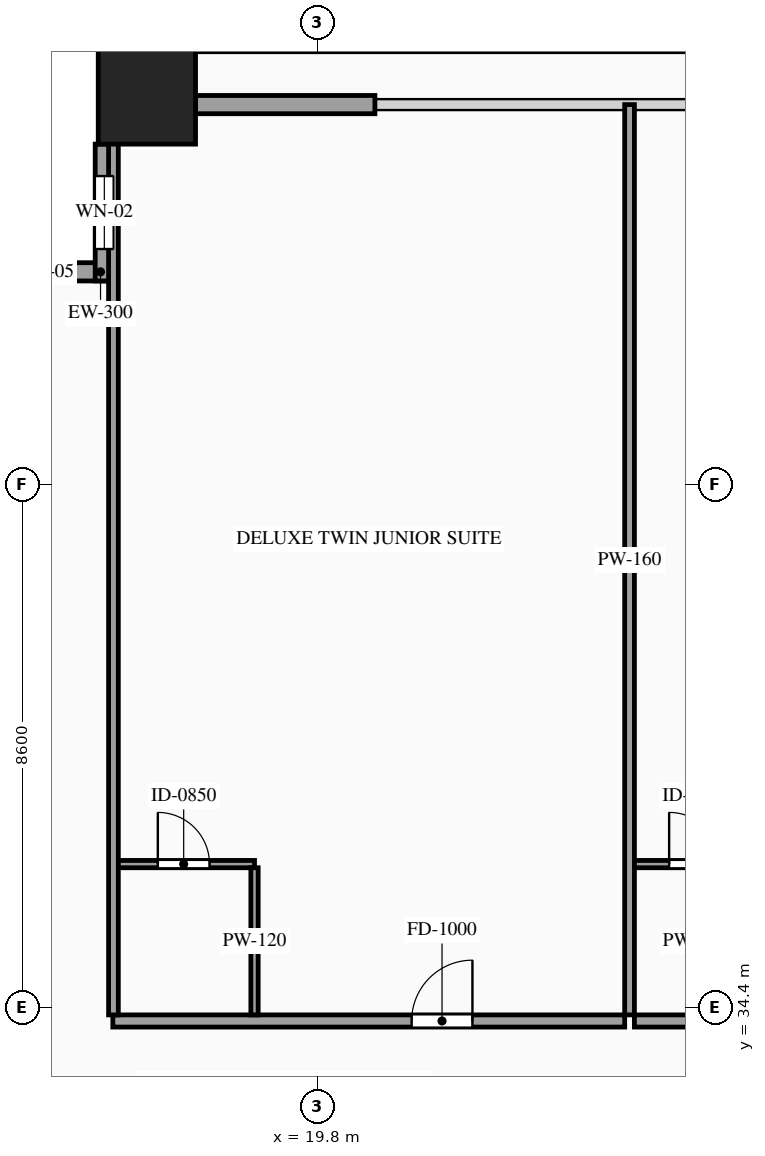
"""IFC4 building model, lengths in metres.
Left out: names, types, materials, properties, quantities, classifications, styles, units other than length and angle.
Written with IfcOpenShell. Run it as: python <this file> out.ifc"""

import sys

from ifc_helpers import new_model, si_unit, direction, frame, frame_2d, origin, origin_2d, place, context, subcontext, project, spatial, rectangle, hollow_rectangle, extrude, source, transform, mapped, element, fill, save


model = new_model("IFC4")
c1 = context("Model", 3, precision=1e-05, world=origin(), true_north=direction((0.0, 1.0)))
c2 = subcontext(c1, "Body", "Model", "MODEL_VIEW")
j1 = project(units=[si_unit("LENGTHUNIT", "METRE"), si_unit("PLANEANGLEUNIT", "RADIAN")], contexts=[c1])
p1 = place(None, origin())
s1 = spatial("IfcSite", under=j1, at=p1, CompositionType="ELEMENT")
p2 = place(p1, origin())
s2 = spatial("IfcBuilding", under=s1, at=p2, CompositionType="ELEMENT")
p3 = place(p2, frame((0.0, 0.0, 145.2)))
s3 = spatial("IfcBuildingStorey", under=s2, at=p3, CompositionType="ELEMENT", Elevation=145.2)
m1 = source(origin(), c2, "Body", "SweptSolid", [
    extrude(hollow_rectangle(XDim=1.6, YDim=1.6, WallThickness=0.07, at=origin_2d()), origin(), (0.0, 0.0, 1.0), 3.6),
])
p4 = place(p3, frame((17.0, 49.4, 0.0), z_axis=(0.0, 0.0, 1.0), x_axis=(1.0, 0.0, 0.0)))
e1 = element("IfcColumn", 1, at=p4, inside=s3, PredefinedType="COLUMN", context=c2, shape_type="MappedRepresentation", body=[
    mapped(m1, transform((0.0, 0.0, 0.0), scale=1.0)),
])
p5 = place(p3, frame((16.45, 46.5, 0.0), z_axis=(0.0, 0.0, 1.0), x_axis=(-1.0, 0.0, 0.0)))
e2 = element("IfcWall", 2, at=p5, inside=s3, PredefinedType="SOLIDWALL", context=c2, shape_type="SweptSolid", body=[
    extrude(rectangle(XDim=2.25, YDim=0.3, at=frame_2d((1.125, 0.0))), origin(), (0.0, 0.0, 1.0), 3.38),
])
p6 = place(p5, frame((0.675, 0.0, 0.85)))
e3 = element("IfcOpeningElement", 3, at=p6, cuts=e2, PredefinedType="OPENING", context=c2, shape_type="SweptSolid", body=[
    extrude(rectangle(XDim=0.9, YDim=1.5, at=frame_2d((0.45, 0.75))), frame((0.0, 0.165, 0.0), z_axis=(0.0, -1.0, 0.0), x_axis=(1.0, 0.0, 0.0)), (0.0, 0.0, 1.0), 0.33),
])
p7 = place(p3, frame((16.3, 48.6, 0.0), z_axis=(0.0, 0.0, 1.0), x_axis=(0.0, -1.0, 0.0)))
e4 = element("IfcWall", 4, at=p7, inside=s3, PredefinedType="SOLIDWALL", context=c2, shape_type="SweptSolid", body=[
    extrude(rectangle(XDim=2.25, YDim=0.3, at=frame_2d((1.125, 0.0))), origin(), (0.0, 0.0, 1.0), 3.38),
])
p8 = place(p7, frame((0.525, 0.0, 0.85)))
e5 = element("IfcOpeningElement", 5, at=p8, cuts=e4, PredefinedType="OPENING", context=c2, shape_type="SweptSolid", body=[
    extrude(rectangle(XDim=1.2, YDim=2.1, at=frame_2d((0.6, 1.05))), frame((0.0, 0.165, 0.0), z_axis=(0.0, -1.0, 0.0), x_axis=(1.0, 0.0, 0.0)), (0.0, 0.0, 1.0), 0.33),
])
m2 = source(origin(), c2, "Body", "SweptSolid", [
    extrude(rectangle(XDim=2.95, YDim=0.3, at=frame_2d((1.475, 0.0))), origin(), (0.0, 0.0, 1.0), 2.775),
])
p9 = place(p3, frame((17.8, 49.25, 0.0), z_axis=(0.0, 0.0, 1.0), x_axis=(1.0, 0.0, 0.0)))
e6 = element("IfcWall", 6, at=p9, inside=s3, PredefinedType="SOLIDWALL", context=c2, shape_type="MappedRepresentation", body=[
    mapped(m2, transform((0.0, 0.0, 0.0), scale=1.0)),
])
p10 = place(p3, frame((16.44, 34.18, 0.0), z_axis=(0.0, 0.0, 1.0), x_axis=(1.0, 0.0, 0.0)))
e7 = element("IfcWall", 7, at=p10, inside=s3, PredefinedType="PARTITIONING", context=c2, shape_type="SweptSolid", body=[
    extrude(rectangle(XDim=8.418, YDim=0.2, at=frame_2d((4.209, 0.0))), origin(), (0.0, 0.0, 1.0), 3.38),
])
p11 = place(p10, frame((4.914, 0.0, 0.0)))
e8 = element("IfcOpeningElement", 8, at=p11, cuts=e7, PredefinedType="OPENING", context=c2, shape_type="SweptSolid", body=[
    extrude(rectangle(XDim=1.0, YDim=2.2, at=frame_2d((0.5, 1.1))), frame((0.0, 0.115, 0.0), z_axis=(0.0, -1.0, 0.0), x_axis=(1.0, 0.0, 0.0)), (0.0, 0.0, 1.0), 0.23),
])
m3 = source(origin(), c2, "Body", "SweptSolid", [
    extrude(rectangle(XDim=14.97, YDim=0.16, at=frame_2d((7.485, 0.0))), origin(), (0.0, 0.0, 1.0), 3.38),
])
p12 = place(p3, frame((24.938, 34.28, 0.0), z_axis=(0.0, 0.0, 1.0), x_axis=(0.0, 1.0, 0.0)))
e9 = element("IfcWall", 9, at=p12, inside=s3, PredefinedType="PARTITIONING", context=c2, shape_type="MappedRepresentation", body=[
    mapped(m3, transform((0.0, 0.0, 0.0), scale=1.0)),
])
p13 = place(p3, frame((16.44, 36.76, 0.0), z_axis=(0.0, 0.0, 1.0), x_axis=(1.0, 0.0, 0.0)))
e10 = element("IfcWall", 10, at=p13, inside=s3, PredefinedType="PARTITIONING", context=c2, shape_type="SweptSolid", body=[
    extrude(rectangle(XDim=2.33, YDim=0.12, at=frame_2d((1.165, 0.0))), origin(), (0.0, 0.0, 1.0), 3.38),
])
p14 = place(p13, frame((0.74, 0.0, 0.0)))
e11 = element("IfcOpeningElement", 11, at=p14, cuts=e10, PredefinedType="OPENING", context=c2, shape_type="SweptSolid", body=[
    extrude(rectangle(XDim=0.85, YDim=2.1, at=frame_2d((0.425, 1.05))), frame((0.0, 0.075, 0.0), z_axis=(0.0, -1.0, 0.0), x_axis=(1.0, 0.0, 0.0)), (0.0, 0.0, 1.0), 0.15),
])
m4 = source(origin(), c2, "Body", "SweptSolid", [
    extrude(rectangle(XDim=2.42, YDim=0.12, at=frame_2d((1.21, 0.0))), origin(), (0.0, 0.0, 1.0), 3.38),
])
p15 = place(p3, frame((18.77, 34.28, 0.0), z_axis=(0.0, 0.0, 1.0), x_axis=(0.0, 1.0, 0.0)))
e12 = element("IfcWall", 12, at=p15, inside=s3, PredefinedType="PARTITIONING", context=c2, shape_type="MappedRepresentation", body=[
    mapped(m4, transform((0.0, 0.0, 0.0), scale=1.0)),
])
p16 = place(p3, frame((25.018, 34.18, 0.0), z_axis=(0.0, 0.0, 1.0), x_axis=(1.0, 0.0, 0.0)))
e13 = element("IfcWall", 13, at=p16, inside=s3, PredefinedType="PARTITIONING", context=c2, shape_type="SweptSolid", body=[
    extrude(rectangle(XDim=4.062, YDim=0.2, at=frame_2d((2.031, 0.0))), origin(), (0.0, 0.0, 1.0), 3.38),
])
p17 = place(p16, frame((2.567, 0.0, 0.0)))
e14 = element("IfcOpeningElement", 14, at=p17, cuts=e13, PredefinedType="OPENING", context=c2, shape_type="SweptSolid", body=[
    extrude(rectangle(XDim=1.0, YDim=2.2, at=frame_2d((0.5, 1.1))), frame((0.0, 0.115, 0.0), z_axis=(0.0, -1.0, 0.0), x_axis=(1.0, 0.0, 0.0)), (0.0, 0.0, 1.0), 0.23),
])
p18 = place(p3, frame((25.018, 36.76, 0.0), z_axis=(0.0, 0.0, 1.0), x_axis=(1.0, 0.0, 0.0)))
e15 = element("IfcWall", 15, at=p18, inside=s3, PredefinedType="PARTITIONING", context=c2, shape_type="SweptSolid", body=[
    extrude(rectangle(XDim=1.992, YDim=0.12, at=frame_2d((0.996, 0.0))), origin(), (0.0, 0.0, 1.0), 3.38),
])
p19 = place(p18, frame((0.571, 0.0, 0.0)))
e16 = element("IfcOpeningElement", 16, at=p19, cuts=e15, PredefinedType="OPENING", context=c2, shape_type="SweptSolid", body=[
    extrude(rectangle(XDim=0.85, YDim=2.1, at=frame_2d((0.425, 1.05))), frame((0.0, 0.075, 0.0), z_axis=(0.0, -1.0, 0.0), x_axis=(1.0, 0.0, 0.0)), (0.0, 0.0, 1.0), 0.15),
])
m5 = source(origin(), c2, "Body", "SweptSolid", [
    extrude(rectangle(XDim=14.82, YDim=0.16, at=frame_2d((7.41, 0.0))), origin(), (0.0, 0.0, 1.0), 3.38),
])
p20 = place(p3, frame((16.45, 34.28, 0.0), z_axis=(0.0, 0.0, 1.0), x_axis=(0.0, 1.0, 0.0)))
e17 = element("IfcWall", 17, at=p20, inside=s3, PredefinedType="PARTITIONING", context=c2, shape_type="MappedRepresentation", body=[
    mapped(m5, transform((0.0, 0.0, 0.0), scale=1.0)),
])
m6 = source(origin(), c2, "Body", "SweptSolid", [
    extrude(rectangle(XDim=0.9, YDim=1.5, at=frame_2d((0.45, 0.75))), frame((0.0, 0.03, 0.0), z_axis=(0.0, -1.0, 0.0), x_axis=(1.0, 0.0, 0.0)), (0.0, 0.0, 1.0), 0.06),
])
p21 = place(p6, origin())
e18 = element("IfcWindow", 18, at=p21, inside=s3, PartitioningType="SINGLE_PANEL", PredefinedType="WINDOW", context=c2, shape_type="MappedRepresentation", body=[
    mapped(m6, transform((0.0, 0.0, 0.0), scale=1.0)),
])
fill(e3, e18)
m7 = source(origin(), c2, "Body", "SweptSolid", [
    extrude(rectangle(XDim=1.2, YDim=2.1, at=frame_2d((0.6, 1.05))), frame((0.0, 0.03, 0.0), z_axis=(0.0, -1.0, 0.0), x_axis=(1.0, 0.0, 0.0)), (0.0, 0.0, 1.0), 0.06),
])
p22 = place(p8, origin())
e19 = element("IfcWindow", 19, at=p22, inside=s3, PartitioningType="SINGLE_PANEL", PredefinedType="WINDOW", context=c2, shape_type="MappedRepresentation", body=[
    mapped(m7, transform((0.0, 0.0, 0.0), scale=1.0)),
])
fill(e5, e19)
m8 = source(origin(), c2, "Body", "SweptSolid", [
    extrude(rectangle(XDim=1.0, YDim=2.2, at=frame_2d((0.5, 1.1))), frame((0.0, 0.025, 0.0), z_axis=(0.0, -1.0, 0.0), x_axis=(1.0, 0.0, 0.0)), (0.0, 0.0, 1.0), 0.05),
])
p23 = place(p11, origin())
e20 = element("IfcDoor", 20, at=p23, inside=s3, OperationType="SINGLE_SWING_RIGHT", PredefinedType="DOOR", context=c2, shape_type="MappedRepresentation", body=[
    mapped(m8, transform((0.0, 0.0, 0.0), scale=1.0)),
])
fill(e8, e20)
m9 = source(origin(), c2, "Body", "SweptSolid", [
    extrude(rectangle(XDim=0.85, YDim=2.1, at=frame_2d((0.425, 1.05))), frame((0.0, 0.025, 0.0), z_axis=(0.0, -1.0, 0.0), x_axis=(1.0, 0.0, 0.0)), (0.0, 0.0, 1.0), 0.05),
])
p24 = place(p14, origin())
e21 = element("IfcDoor", 21, at=p24, inside=s3, OperationType="SINGLE_SWING_LEFT", PredefinedType="DOOR", context=c2, shape_type="MappedRepresentation", body=[
    mapped(m9, transform((0.0, 0.0, 0.0), scale=1.0)),
])
fill(e11, e21)
p25 = place(p19, origin())
e22 = element("IfcDoor", 22, at=p25, inside=s3, OperationType="SINGLE_SWING_LEFT", PredefinedType="DOOR", context=c2, shape_type="MappedRepresentation", body=[
    mapped(m9, transform((0.0, 0.0, 0.0), scale=1.0)),
])
fill(e16, e22)
save(model, sys.argv[1])
